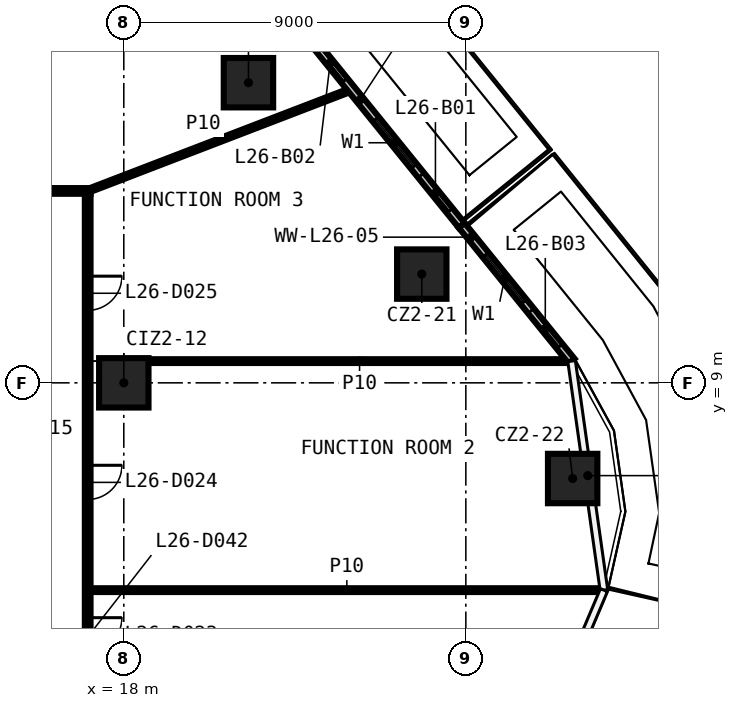
"""IFC4 building model, lengths in metres.
Left out: names, types, materials, properties, quantities, classifications, styles, units other than length and angle.
Written with IfcOpenShell. Run it as: python <this file> out.ifc"""

import sys

from ifc_helpers import new_model, si_unit, direction, frame, frame_2d, origin, origin_2d, place, context, subcontext, project, spatial, rectangle, extrude, element, fill, save


model = new_model("IFC4")
c1 = context("Model", 3, precision=1e-05, world=origin(), true_north=direction((0.0, 1.0)))
c2 = subcontext(c1, "Body", "Model", "MODEL_VIEW")
j1 = project(units=[si_unit("LENGTHUNIT", "METRE"), si_unit("PLANEANGLEUNIT", "RADIAN")], contexts=[c1])
p1 = place(None, origin())
s1 = spatial("IfcSite", under=j1, at=p1, CompositionType="ELEMENT")
p2 = place(p1, origin())
s2 = spatial("IfcBuilding", under=s1, at=p2, CompositionType="ELEMENT")
p3 = place(p2, frame((0.0, 0.0, 121.1)))
s3 = spatial("IfcBuildingStorey", under=s2, at=p3, CompositionType="ELEMENT", Elevation=121.1)
for number, where, z_axis, x_axis in (
    (1, (21.28, 16.898, 0.0), (0.0, 0.0, 1.0), (1.0, 0.0, 0.0)),
    (2, (25.841, 11.862, 0.0), (0.0, 0.0, 1.0), (1.0, 0.0, 0.0)),
    (3, (29.811, 6.482, 0.0), (0.0, 0.0, 1.0), (1.0, 0.0, 0.0)),
    (4, (18.0, 9.0, 0.0), (0.0, 0.0, 1.0), (1.0, 0.0, 0.0)),
):
    element("IfcColumn", number, at=place(p3, frame(where, z_axis=z_axis, x_axis=x_axis)), inside=s3, PredefinedType="COLUMN", context=c2, shape_type="SweptSolid", body=[
        extrude(rectangle(XDim=1.3, YDim=1.3, at=origin_2d()), origin(), (0.0, 0.0, 1.0), 3.3),
    ])
p4 = place(p3, frame((17.125, 3.545, 0.0), z_axis=(0.0, 0.0, 1.0), x_axis=(1.0, 0.0, 0.0)))
e5 = element("IfcWall", 5, at=p4, inside=s3, PredefinedType="PARTITIONING", context=c2, shape_type="SweptSolid", body=[
    extrude(rectangle(XDim=13.487, YDim=0.1, at=frame_2d((6.743, 0.0))), origin(), (0.0, 0.0, 1.0), 3.3),
])
p5 = place(p3, frame((18.65, 9.572, 0.0), z_axis=(0.0, 0.0, 1.0), x_axis=(1.0, 0.0, 0.0)))
e6 = element("IfcWall", 6, at=p5, inside=s3, PredefinedType="PARTITIONING", context=c2, shape_type="SweptSolid", body=[
    extrude(rectangle(XDim=11.107, YDim=0.1, at=frame_2d((5.554, 0.0))), origin(), (0.0, 0.0, 1.0), 3.3),
])
p6 = place(p3, frame((-17.125, 14.05, 0.0), z_axis=(0.0, 0.0, 1.0), x_axis=(1.0, 0.0, 0.0)))
e7 = element("IfcWall", 7, at=p6, inside=s3, PredefinedType="PARTITIONING", context=c2, shape_type="SweptSolid", body=[
    extrude(rectangle(XDim=34.25, YDim=0.15, at=frame_2d((17.125, 0.0))), origin(), (0.0, 0.0, 1.0), 3.3),
])
p7 = place(p6, frame((30.377, 0.0, 0.0)))
e8 = element("IfcOpeningElement", 8, at=p7, cuts=e7, PredefinedType="OPENING", context=c2, shape_type="SweptSolid", body=[
    extrude(rectangle(XDim=0.9, YDim=2.1, at=frame_2d((0.45, 1.05))), frame((0.0, 0.085, 0.0), z_axis=(0.0, -1.0, 0.0), x_axis=(1.0, 0.0, 0.0)), (0.0, 0.0, 1.0), 0.17),
])
p8 = place(p6, frame((23.321, 0.0, 0.0)))
e9 = element("IfcOpeningElement", 9, at=p8, cuts=e7, PredefinedType="OPENING", context=c2, shape_type="SweptSolid", body=[
    extrude(rectangle(XDim=1.0, YDim=2.1, at=frame_2d((0.5, 1.05))), frame((0.0, 0.085, 0.0), z_axis=(0.0, -1.0, 0.0), x_axis=(1.0, 0.0, 0.0)), (0.0, 0.0, 1.0), 0.17),
])
p9 = place(p6, frame((21.183, 0.0, 0.0)))
e10 = element("IfcOpeningElement", 10, at=p9, cuts=e7, PredefinedType="OPENING", context=c2, shape_type="SweptSolid", body=[
    extrude(rectangle(XDim=1.0, YDim=2.1, at=frame_2d((0.5, 1.05))), frame((0.0, 0.085, 0.0), z_axis=(0.0, -1.0, 0.0), x_axis=(1.0, 0.0, 0.0)), (0.0, 0.0, 1.0), 0.17),
])
p10 = place(p6, frame((14.241, 0.0, 0.0)))
e11 = element("IfcOpeningElement", 11, at=p10, cuts=e7, PredefinedType="OPENING", context=c2, shape_type="SweptSolid", body=[
    extrude(rectangle(XDim=1.0, YDim=2.1, at=frame_2d((0.5, 1.05))), frame((0.0, 0.085, 0.0), z_axis=(0.0, -1.0, 0.0), x_axis=(1.0, 0.0, 0.0)), (0.0, 0.0, 1.0), 0.17),
])
p11 = place(p6, frame((12.099, 0.0, 0.0)))
e12 = element("IfcOpeningElement", 12, at=p11, cuts=e7, PredefinedType="OPENING", context=c2, shape_type="SweptSolid", body=[
    extrude(rectangle(XDim=1.0, YDim=2.1, at=frame_2d((0.5, 1.05))), frame((0.0, 0.085, 0.0), z_axis=(0.0, -1.0, 0.0), x_axis=(1.0, 0.0, 0.0)), (0.0, 0.0, 1.0), 0.17),
])
p12 = place(p6, frame((5.161, 0.0, 0.0)))
e13 = element("IfcOpeningElement", 13, at=p12, cuts=e7, PredefinedType="OPENING", context=c2, shape_type="SweptSolid", body=[
    extrude(rectangle(XDim=1.0, YDim=2.1, at=frame_2d((0.5, 1.05))), frame((0.0, 0.085, 0.0), z_axis=(0.0, -1.0, 0.0), x_axis=(1.0, 0.0, 0.0)), (0.0, 0.0, 1.0), 0.17),
])
p13 = place(p6, frame((2.406, 0.0, 0.0)))
e14 = element("IfcOpeningElement", 14, at=p13, cuts=e7, PredefinedType="OPENING", context=c2, shape_type="SweptSolid", body=[
    extrude(rectangle(XDim=0.9, YDim=2.1, at=frame_2d((0.45, 1.05))), frame((0.0, 0.085, 0.0), z_axis=(0.0, -1.0, 0.0), x_axis=(1.0, 0.0, 0.0)), (0.0, 0.0, 1.0), 0.17),
])
p14 = place(p3, frame((17.05, 14.05, 0.0), z_axis=(0.0, 0.0, 1.0), x_axis=(0.933461735893, 0.358676996228, 0.0)))
e15 = element("IfcWall", 15, at=p14, inside=s3, PredefinedType="PARTITIONING", context=c2, shape_type="SweptSolid", body=[
    extrude(rectangle(XDim=7.42, YDim=0.1, at=frame_2d((3.71, 0.0))), origin(), (0.0, 0.0, 1.0), 3.3),
])
p15 = place(p3, frame((17.05, 13.975, 0.0), z_axis=(0.0, 0.0, 1.0), x_axis=(0.0, -1.0, 0.0)))
e16 = element("IfcWall", 16, at=p15, inside=s3, PredefinedType="PARTITIONING", context=c2, shape_type="SweptSolid", body=[
    extrude(rectangle(XDim=27.95, YDim=0.15, at=frame_2d((13.975, 0.0))), origin(), (0.0, 0.0, 1.0), 3.3),
])
p16 = place(p15, frame((25.545, 0.0, 0.0)))
e17 = element("IfcOpeningElement", 17, at=p16, cuts=e16, PredefinedType="OPENING", context=c2, shape_type="SweptSolid", body=[
    extrude(rectangle(XDim=1.0, YDim=2.1, at=frame_2d((0.5, 1.05))), frame((0.0, 0.085, 0.0), z_axis=(0.0, -1.0, 0.0), x_axis=(1.0, 0.0, 0.0)), (0.0, 0.0, 1.0), 0.17),
])
p17 = place(p15, frame((19.024, 0.0, 0.0)))
e18 = element("IfcOpeningElement", 18, at=p17, cuts=e16, PredefinedType="OPENING", context=c2, shape_type="SweptSolid", body=[
    extrude(rectangle(XDim=1.0, YDim=2.1, at=frame_2d((0.5, 1.05))), frame((0.0, 0.085, 0.0), z_axis=(0.0, -1.0, 0.0), x_axis=(1.0, 0.0, 0.0)), (0.0, 0.0, 1.0), 0.17),
])
p18 = place(p15, frame((17.303, 0.0, 0.0)))
e19 = element("IfcOpeningElement", 19, at=p18, cuts=e16, PredefinedType="OPENING", context=c2, shape_type="SweptSolid", body=[
    extrude(rectangle(XDim=1.0, YDim=2.1, at=frame_2d((0.5, 1.05))), frame((0.0, 0.085, 0.0), z_axis=(0.0, -1.0, 0.0), x_axis=(1.0, 0.0, 0.0)), (0.0, 0.0, 1.0), 0.17),
])
p19 = place(p15, frame((11.155, 0.0, 0.0)))
e20 = element("IfcOpeningElement", 20, at=p19, cuts=e16, PredefinedType="OPENING", context=c2, shape_type="SweptSolid", body=[
    extrude(rectangle(XDim=0.9, YDim=2.1, at=frame_2d((0.45, 1.05))), frame((0.0, 0.085, 0.0), z_axis=(0.0, -1.0, 0.0), x_axis=(1.0, 0.0, 0.0)), (0.0, 0.0, 1.0), 0.17),
])
p20 = place(p15, frame((7.145, 0.0, 0.0)))
e21 = element("IfcOpeningElement", 21, at=p20, cuts=e16, PredefinedType="OPENING", context=c2, shape_type="SweptSolid", body=[
    extrude(rectangle(XDim=0.9, YDim=2.1, at=frame_2d((0.45, 1.05))), frame((0.0, 0.085, 0.0), z_axis=(0.0, -1.0, 0.0), x_axis=(1.0, 0.0, 0.0)), (0.0, 0.0, 1.0), 0.17),
])
p21 = place(p15, frame((2.168, 0.0, 0.0)))
e22 = element("IfcOpeningElement", 22, at=p21, cuts=e16, PredefinedType="OPENING", context=c2, shape_type="SweptSolid", body=[
    extrude(rectangle(XDim=0.9, YDim=2.1, at=frame_2d((0.45, 1.05))), frame((0.0, 0.085, 0.0), z_axis=(0.0, -1.0, 0.0), x_axis=(1.0, 0.0, 0.0)), (0.0, 0.0, 1.0), 0.17),
])
p22 = place(p3, frame((26.892, 13.142, 0.0), z_axis=(0.0, 0.0, 1.0), x_axis=(-0.629299699172, 0.777162716953, 0.0)))
e23 = element("IfcWall", 23, at=p22, inside=s3, PredefinedType="SOLIDWALL", context=c2, shape_type="SweptSolid", body=[
    extrude(rectangle(XDim=9.205, YDim=0.2, at=frame_2d((4.603, 0.0))), origin(), (0.0, 0.0, 1.0), 3.3),
])
p23 = place(p22, frame((2.0, 0.0, 0.6)))
e24 = element("IfcOpeningElement", 24, at=p23, cuts=e23, PredefinedType="OPENING", context=c2, shape_type="SweptSolid", body=[
    extrude(rectangle(XDim=1.6, YDim=2.4, at=frame_2d((0.8, 1.2))), frame((0.0, 0.11, 0.0), z_axis=(0.0, -1.0, 0.0), x_axis=(1.0, 0.0, 0.0)), (0.0, 0.0, 1.0), 0.22),
])
p24 = place(p22, frame((0.5, 0.0, 0.0)))
e25 = element("IfcOpeningElement", 25, at=p24, cuts=e23, PredefinedType="OPENING", context=c2, shape_type="SweptSolid", body=[
    extrude(rectangle(XDim=1.2, YDim=2.4, at=frame_2d((0.6, 1.2))), frame((0.0, 0.11, 0.0), z_axis=(0.0, -1.0, 0.0), x_axis=(1.0, 0.0, 0.0)), (0.0, 0.0, 1.0), 0.22),
])
p25 = place(p22, frame((6.603, 0.0, 0.6)))
e26 = element("IfcOpeningElement", 26, at=p25, cuts=e23, PredefinedType="OPENING", context=c2, shape_type="SweptSolid", body=[
    extrude(rectangle(XDim=1.6, YDim=2.4, at=frame_2d((0.8, 1.2))), frame((0.0, 0.11, 0.0), z_axis=(0.0, -1.0, 0.0), x_axis=(1.0, 0.0, 0.0)), (0.0, 0.0, 1.0), 0.22),
])
p26 = place(p22, frame((4.903, 0.0, 0.0)))
e27 = element("IfcOpeningElement", 27, at=p26, cuts=e23, PredefinedType="OPENING", context=c2, shape_type="SweptSolid", body=[
    extrude(rectangle(XDim=1.2, YDim=2.4, at=frame_2d((0.6, 1.2))), frame((0.0, 0.11, 0.0), z_axis=(0.0, -1.0, 0.0), x_axis=(1.0, 0.0, 0.0)), (0.0, 0.0, 1.0), 0.22),
])
p27 = place(p3, frame((29.783, 9.572, 0.0), z_axis=(0.0, 0.0, 1.0), x_axis=(-0.629299136059, 0.777163172928, 0.0)))
e28 = element("IfcWall", 28, at=p27, inside=s3, PredefinedType="SOLIDWALL", context=c2, shape_type="SweptSolid", body=[
    extrude(rectangle(XDim=4.594, YDim=0.2, at=frame_2d((2.297, 0.0))), origin(), (0.0, 0.0, 1.0), 3.3),
])
p28 = place(p27, frame((2.0, 0.0, 0.6)))
e29 = element("IfcOpeningElement", 29, at=p28, cuts=e28, PredefinedType="OPENING", context=c2, shape_type="SweptSolid", body=[
    extrude(rectangle(XDim=1.6, YDim=2.4, at=frame_2d((0.8, 1.2))), frame((0.0, 0.11, 0.0), z_axis=(0.0, -1.0, 0.0), x_axis=(1.0, 0.0, 0.0)), (0.0, 0.0, 1.0), 0.22),
])
p29 = place(p27, frame((0.5, 0.0, 0.0)))
e30 = element("IfcOpeningElement", 30, at=p29, cuts=e28, PredefinedType="OPENING", context=c2, shape_type="SweptSolid", body=[
    extrude(rectangle(XDim=1.2, YDim=2.4, at=frame_2d((0.6, 1.2))), frame((0.0, 0.11, 0.0), z_axis=(0.0, -1.0, 0.0), x_axis=(1.0, 0.0, 0.0)), (0.0, 0.0, 1.0), 0.22),
])
p30 = place(p19, origin())
e31 = element("IfcDoor", 31, at=p30, inside=s3, OperationType="SINGLE_SWING_RIGHT", PredefinedType="DOOR", context=c2, shape_type="SweptSolid", body=[
    extrude(rectangle(XDim=0.9, YDim=2.1, at=frame_2d((0.45, 1.05))), frame((0.0, 0.025, 0.0), z_axis=(0.0, -1.0, 0.0), x_axis=(1.0, 0.0, 0.0)), (0.0, 0.0, 1.0), 0.05),
])
fill(e20, e31)
p31 = place(p20, origin())
e32 = element("IfcDoor", 32, at=p31, inside=s3, OperationType="SINGLE_SWING_LEFT", PredefinedType="DOOR", context=c2, shape_type="SweptSolid", body=[
    extrude(rectangle(XDim=0.9, YDim=2.1, at=frame_2d((0.45, 1.05))), frame((0.0, 0.025, 0.0), z_axis=(0.0, -1.0, 0.0), x_axis=(1.0, 0.0, 0.0)), (0.0, 0.0, 1.0), 0.05),
])
fill(e21, e32)
p32 = place(p21, origin())
e33 = element("IfcDoor", 33, at=p32, inside=s3, OperationType="SINGLE_SWING_RIGHT", PredefinedType="DOOR", context=c2, shape_type="SweptSolid", body=[
    extrude(rectangle(XDim=0.9, YDim=2.1, at=frame_2d((0.45, 1.05))), frame((0.0, 0.025, 0.0), z_axis=(0.0, -1.0, 0.0), x_axis=(1.0, 0.0, 0.0)), (0.0, 0.0, 1.0), 0.05),
])
fill(e22, e33)
p33 = place(p23, origin())
e34 = element("IfcWindow", 34, at=p33, inside=s3, PartitioningType="SINGLE_PANEL", PredefinedType="WINDOW", context=c2, shape_type="SweptSolid", body=[
    extrude(rectangle(XDim=1.6, YDim=2.4, at=frame_2d((0.8, 1.2))), frame((0.0, 0.03, 0.0), z_axis=(0.0, -1.0, 0.0), x_axis=(1.0, 0.0, 0.0)), (0.0, 0.0, 1.0), 0.06),
])
fill(e24, e34)
p34 = place(p24, origin())
e35 = element("IfcDoor", 35, at=p34, inside=s3, OperationType="SLIDING_TO_LEFT", PredefinedType="DOOR", context=c2, shape_type="SweptSolid", body=[
    extrude(rectangle(XDim=1.2, YDim=2.4, at=frame_2d((0.6, 1.2))), frame((0.0, 0.025, 0.0), z_axis=(0.0, -1.0, 0.0), x_axis=(1.0, 0.0, 0.0)), (0.0, 0.0, 1.0), 0.05),
])
fill(e25, e35)
p35 = place(p26, origin())
e36 = element("IfcDoor", 36, at=p35, inside=s3, OperationType="SLIDING_TO_LEFT", PredefinedType="DOOR", context=c2, shape_type="SweptSolid", body=[
    extrude(rectangle(XDim=1.2, YDim=2.4, at=frame_2d((0.6, 1.2))), frame((0.0, 0.025, 0.0), z_axis=(0.0, -1.0, 0.0), x_axis=(1.0, 0.0, 0.0)), (0.0, 0.0, 1.0), 0.05),
])
fill(e27, e36)
p36 = place(p28, origin())
e37 = element("IfcWindow", 37, at=p36, inside=s3, PartitioningType="SINGLE_PANEL", PredefinedType="WINDOW", context=c2, shape_type="SweptSolid", body=[
    extrude(rectangle(XDim=1.6, YDim=2.4, at=frame_2d((0.8, 1.2))), frame((0.0, 0.03, 0.0), z_axis=(0.0, -1.0, 0.0), x_axis=(1.0, 0.0, 0.0)), (0.0, 0.0, 1.0), 0.06),
])
fill(e29, e37)
p37 = place(p29, origin())
e38 = element("IfcDoor", 38, at=p37, inside=s3, OperationType="SLIDING_TO_LEFT", PredefinedType="DOOR", context=c2, shape_type="SweptSolid", body=[
    extrude(rectangle(XDim=1.2, YDim=2.4, at=frame_2d((0.6, 1.2))), frame((0.0, 0.025, 0.0), z_axis=(0.0, -1.0, 0.0), x_axis=(1.0, 0.0, 0.0)), (0.0, 0.0, 1.0), 0.05),
])
fill(e30, e38)
save(model, sys.argv[1])
